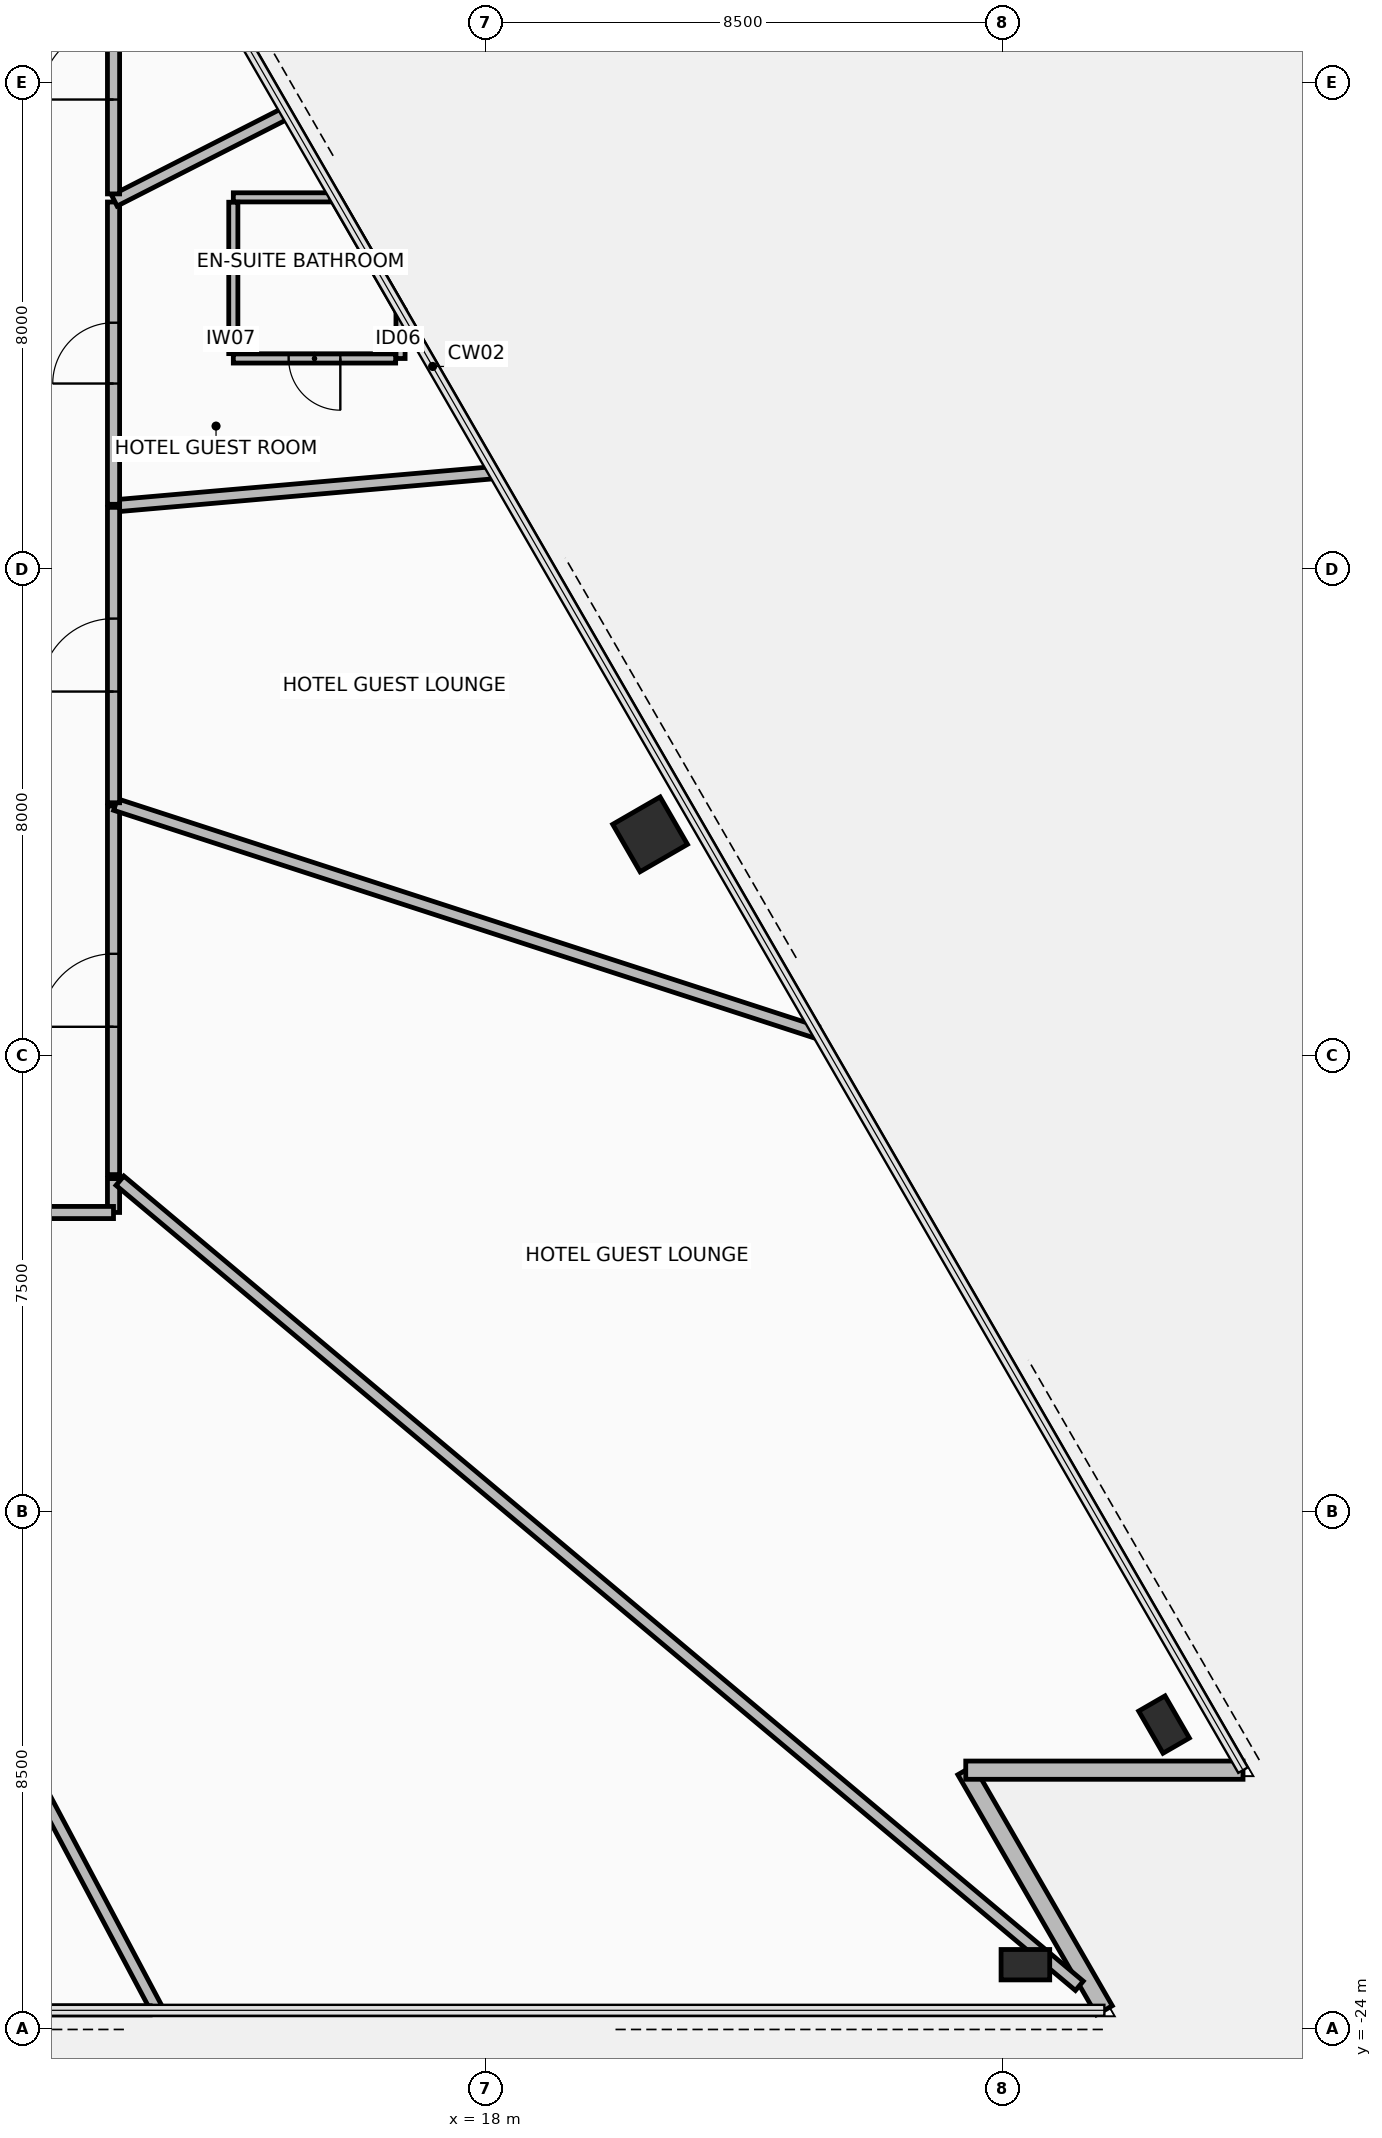
"""IFC4 building model, lengths in metres.
Left out: names, types, materials, properties, quantities, classifications, styles, units other than length and angle.
Written with IfcOpenShell. Run it as: python <this file> out.ifc"""

import sys

from ifc_helpers import new_model, si_unit, direction, frame, frame_2d, origin, origin_2d, place, context, subcontext, project, spatial, rectangle, hollow_rectangle, extrude, element, fill, save


model = new_model("IFC4")
c1 = context("Model", 3, precision=1e-05, world=origin(), true_north=direction((0.0, 1.0)))
c2 = subcontext(c1, "Body", "Model", "MODEL_VIEW")
j1 = project(units=[si_unit("LENGTHUNIT", "METRE"), si_unit("PLANEANGLEUNIT", "RADIAN")], contexts=[c1])
p1 = place(None, origin())
s1 = spatial("IfcSite", under=j1, at=p1, CompositionType="ELEMENT")
p2 = place(p1, origin())
s2 = spatial("IfcBuilding", under=s1, at=p2, CompositionType="ELEMENT")
p3 = place(p2, frame((0.0, 0.0, 31.8)))
s3 = spatial("IfcBuildingStorey", under=s2, at=p3, CompositionType="ELEMENT", Elevation=31.8)
for number, where, z_axis, x_axis in (
    (1, (26.877, -22.95, 0.0), (0.0, 0.0, 1.0), (1.0, 0.0, 0.0)),
    (2, (29.157, -19.001, 0.0), (0.0, 0.0, 1.0), (-0.5, 0.866, 0.0)),
):
    element("IfcColumn", number, at=place(p3, frame(where, z_axis=z_axis, x_axis=x_axis)), inside=s3, PredefinedType="COLUMN", context=c2, shape_type="SweptSolid", body=[
        extrude(hollow_rectangle(XDim=0.5, YDim=0.8, WallThickness=0.04, at=origin_2d()), origin(), (0.0, 0.0, 1.0), 3.45),
    ])
p4 = place(p3, frame((20.705, -4.361, 0.0), z_axis=(0.0, 0.0, 1.0), x_axis=(-0.500001511499, 0.866024531118, 0.0)))
e3 = element("IfcColumn", 3, at=p4, inside=s3, PredefinedType="COLUMN", context=c2, shape_type="SweptSolid", body=[
    extrude(hollow_rectangle(XDim=0.9, YDim=0.9, WallThickness=0.05, at=origin_2d()), origin(), (0.0, 0.0, 1.0), 3.45),
])
p5 = place(p3, frame((28.176, -23.7, 0.0), z_axis=(0.0, 0.0, 1.0), x_axis=(-0.500014431597, 0.866017071537, 0.0)))
e4 = element("IfcWall", 4, at=p5, inside=s3, PredefinedType="STANDARD", context=c2, shape_type="SweptSolid", body=[
    extrude(rectangle(XDim=4.56, YDim=0.3, at=frame_2d((2.28, 0.0))), origin(), (0.0, 0.0, 1.0), 2.47),
])
p6 = place(p3, frame((25.896, -19.751, 0.0), z_axis=(0.0, 0.0, 1.0), x_axis=(1.0, 0.0, 0.0)))
e5 = element("IfcWall", 5, at=p6, inside=s3, PredefinedType="STANDARD", context=c2, shape_type="SweptSolid", body=[
    extrude(rectangle(XDim=4.56, YDim=0.3, at=frame_2d((2.28, 0.0))), origin(), (0.0, 0.0, 1.0), 2.47),
])
p7 = place(p3, frame((13.85, 6.114, 0.0), z_axis=(0.0, 0.0, 1.0), x_axis=(1.0, 0.0, 0.0)))
e6 = element("IfcWall", 6, at=p7, inside=s3, PredefinedType="PARTITIONING", context=c2, shape_type="SweptSolid", body=[
    extrude(rectangle(XDim=1.672, YDim=0.15, at=frame_2d((0.836, 0.0))), origin(), (0.0, 0.0, 1.0), 2.47),
])
p8 = place(p3, frame((15.522, 6.114, 0.0), z_axis=(0.0, 0.0, 1.0), x_axis=(0.500062410969, -0.865989367796, 0.0)))
e7 = element("IfcWall", 7, at=p8, inside=s3, PredefinedType="PARTITIONING", context=c2, shape_type="SweptSolid", body=[
    extrude(rectangle(XDim=2.155, YDim=0.15, at=frame_2d((1.078, 0.0))), origin(), (0.0, 0.0, 1.0), 3.275),
])
p9 = place(p3, frame((16.6, 4.248, 0.0), z_axis=(0.0, 0.0, 1.0), x_axis=(0.0, -1.0, 0.0)))
e8 = element("IfcWall", 8, at=p9, inside=s3, PredefinedType="PARTITIONING", context=c2, shape_type="SweptSolid", body=[
    extrude(rectangle(XDim=0.784, YDim=0.15, at=frame_2d((0.392, 0.0))), origin(), (0.0, 0.0, 1.0), 3.275),
])
p10 = place(p3, frame((16.52, 3.464, 0.0), z_axis=(0.0, 0.0, 1.0), x_axis=(-1.0, 0.0, 0.0)))
e9 = element("IfcWall", 9, at=p10, inside=s3, PredefinedType="PARTITIONING", context=c2, shape_type="SweptSolid", body=[
    extrude(rectangle(XDim=2.67, YDim=0.15, at=frame_2d((1.335, 0.0))), origin(), (0.0, 0.0, 1.0), 2.47),
])
p11 = place(p10, frame((0.91, 0.0, 0.0)))
e10 = element("IfcOpeningElement", 10, at=p11, cuts=e9, PredefinedType="OPENING", context=c2, shape_type="SweptSolid", body=[
    extrude(rectangle(XDim=0.85, YDim=2.1, at=frame_2d((0.425, 1.05))), frame((0.0, 0.085, 0.0), z_axis=(0.0, -1.0, 0.0), x_axis=(1.0, 0.0, 0.0)), (0.0, 0.0, 1.0), 0.17),
])
p12 = place(p3, frame((13.85, 3.544, 0.0), z_axis=(0.0, 0.0, 1.0), x_axis=(0.0, 1.0, 0.0)))
e11 = element("IfcWall", 11, at=p12, inside=s3, PredefinedType="PARTITIONING", context=c2, shape_type="SweptSolid", body=[
    extrude(rectangle(XDim=2.49, YDim=0.15, at=frame_2d((1.245, 0.0))), origin(), (0.0, 0.0, 1.0), 2.87),
])
p13 = place(p3, frame((7.179, -13.502, 0.0), z_axis=(0.0, 0.0, 1.0), x_axis=(0.469478708188, -0.882943793544, 0.0)))
e12 = element("IfcWall", 12, at=p13, inside=s3, PredefinedType="PARTITIONING", context=c2, shape_type="SweptSolid", body=[
    extrude(rectangle(XDim=11.55, YDim=0.2, at=frame_2d((5.775, 0.0))), origin(), (0.0, 0.0, 1.0), 2.47),
])
p14 = place(p3, frame((12.483, -23.7, 0.0), z_axis=(0.0, 0.0, 1.0), x_axis=(-1.0, 0.0, 0.0)))
e13 = element("IfcWall", 13, at=p14, inside=s3, PredefinedType="PARTITIONING", context=c2, shape_type="SweptSolid", body=[
    extrude(rectangle(XDim=10.386, YDim=0.15, at=frame_2d((5.193, 0.0))), origin(), (0.0, 0.0, 1.0), 3.275),
])
p15 = place(p3, frame((18.136, 1.587, 0.0), z_axis=(0.0, 0.0, 1.0), x_axis=(-0.99619562433, -0.087145155144, 0.0)))
e14 = element("IfcWall", 14, at=p15, inside=s3, PredefinedType="PARTITIONING", context=c2, shape_type="SweptSolid", body=[
    extrude(rectangle(XDim=6.253, YDim=0.2, at=frame_2d((3.126, 0.0))), origin(), (0.0, 0.0, 1.0), 2.47),
])
p16 = place(p3, frame((11.88, 1.067, 0.0), z_axis=(0.0, 0.0, 1.0), x_axis=(0.0, 1.0, 0.0)))
e15 = element("IfcWall", 15, at=p16, inside=s3, PredefinedType="PARTITIONING", context=c2, shape_type="SweptSolid", body=[
    extrude(rectangle(XDim=4.971, YDim=0.2, at=frame_2d((2.486, 0.0))), origin(), (0.0, 0.0, 1.0), 2.87),
])
p17 = place(p16, frame((1.986, 0.0, 0.0)))
e16 = element("IfcOpeningElement", 16, at=p17, cuts=e15, PredefinedType="OPENING", context=c2, shape_type="SweptSolid", body=[
    extrude(rectangle(XDim=1.0, YDim=2.15, at=frame_2d((0.5, 1.075))), frame((0.0, 0.11, 0.0), z_axis=(0.0, -1.0, 0.0), x_axis=(1.0, 0.0, 0.0)), (0.0, 0.0, 1.0), 0.22),
])
p18 = place(p3, frame((11.894, 6.06, 0.0), z_axis=(0.0, 0.0, 1.0), x_axis=(0.89097561597, 0.454051155429, 0.0)))
e17 = element("IfcWall", 17, at=p18, inside=s3, PredefinedType="PARTITIONING", context=c2, shape_type="SweptSolid", body=[
    extrude(rectangle(XDim=3.15, YDim=0.2, at=frame_2d((1.575, 0.0))), origin(), (0.0, 0.0, 1.0), 2.47),
])
p19 = place(p3, frame((11.88, 6.171, 0.0), z_axis=(0.0, 0.0, 1.0), x_axis=(0.0, 1.0, 0.0)))
e18 = element("IfcWall", 18, at=p19, inside=s3, PredefinedType="PARTITIONING", context=c2, shape_type="SweptSolid", body=[
    extrude(rectangle(XDim=4.304, YDim=0.2, at=frame_2d((2.152, 0.0))), origin(), (0.0, 0.0, 1.0), 2.47),
])
p20 = place(p19, frame((1.552, 0.0, 0.0)))
e19 = element("IfcOpeningElement", 19, at=p20, cuts=e18, PredefinedType="OPENING", context=c2, shape_type="SweptSolid", body=[
    extrude(rectangle(XDim=1.2, YDim=2.15, at=frame_2d((0.6, 1.075))), frame((0.0, 0.11, 0.0), z_axis=(0.0, -1.0, 0.0), x_axis=(1.0, 0.0, 0.0)), (0.0, 0.0, 1.0), 0.22),
])
p21 = place(p3, frame((11.88, -10.579, 0.0), z_axis=(0.0, 0.0, 1.0), x_axis=(0.0, 1.0, 0.0)))
e20 = element("IfcWall", 20, at=p21, inside=s3, PredefinedType="PARTITIONING", context=c2, shape_type="SweptSolid", body=[
    extrude(rectangle(XDim=0.557, YDim=0.2, at=frame_2d((0.279, 0.0))), origin(), (0.0, 0.0, 1.0), 2.67),
])
p22 = place(p3, frame((11.985, -10.057, 0.0), z_axis=(0.0, 0.0, 1.0), x_axis=(0.766043557541, -0.642788665076, 0.0)))
e21 = element("IfcWall", 21, at=p22, inside=s3, PredefinedType="PARTITIONING", context=c2, shape_type="SweptSolid", body=[
    extrude(rectangle(XDim=20.598, YDim=0.2, at=frame_2d((10.299, 0.0))), origin(), (0.0, 0.0, 1.0), 2.47),
])
p23 = place(p3, frame((8.232, -10.58, 0.0), z_axis=(0.0, 0.0, 1.0), x_axis=(1.0, 0.0, 0.0)))
e22 = element("IfcWall", 22, at=p23, inside=s3, PredefinedType="PARTITIONING", context=c2, shape_type="SweptSolid", body=[
    extrude(rectangle(XDim=3.647, YDim=0.2, at=frame_2d((1.823, 0.0))), origin(), (0.0, 0.0, 1.0), 2.67),
])
p24 = place(p23, frame((1.324, 0.0, 0.0)))
e23 = element("IfcOpeningElement", 23, at=p24, cuts=e22, PredefinedType="OPENING", context=c2, shape_type="SweptSolid", body=[
    extrude(rectangle(XDim=1.0, YDim=2.15, at=frame_2d((0.5, 1.075))), frame((0.0, 0.11, 0.0), z_axis=(0.0, -1.0, 0.0), x_axis=(1.0, 0.0, 0.0)), (0.0, 0.0, 1.0), 0.22),
])
p25 = place(p3, frame((11.88, -9.957, 0.0), z_axis=(0.0, 0.0, 1.0), x_axis=(0.0, 1.0, 0.0)))
e24 = element("IfcWall", 24, at=p25, inside=s3, PredefinedType="PARTITIONING", context=c2, shape_type="SweptSolid", body=[
    extrude(rectangle(XDim=6.062, YDim=0.2, at=frame_2d((3.031, 0.0))), origin(), (0.0, 0.0, 1.0), 2.67),
])
p26 = place(p25, frame((2.431, 0.0, 0.0)))
e25 = element("IfcOpeningElement", 25, at=p26, cuts=e24, PredefinedType="OPENING", context=c2, shape_type="SweptSolid", body=[
    extrude(rectangle(XDim=1.2, YDim=2.15, at=frame_2d((0.6, 1.075))), frame((0.0, 0.11, 0.0), z_axis=(0.0, -1.0, 0.0), x_axis=(1.0, 0.0, 0.0)), (0.0, 0.0, 1.0), 0.22),
])
p27 = place(p3, frame((11.913, -3.871, 0.0), z_axis=(0.0, 0.0, 1.0), x_axis=(0.95105241731, -0.30902960947, 0.0)))
e26 = element("IfcWall", 26, at=p27, inside=s3, PredefinedType="PARTITIONING", context=c2, shape_type="SweptSolid", body=[
    extrude(rectangle(XDim=12.124, YDim=0.2, at=frame_2d((6.062, 0.0))), origin(), (0.0, 0.0, 1.0), 2.47),
])
p28 = place(p3, frame((11.88, -3.842, 0.0), z_axis=(0.0, 0.0, 1.0), x_axis=(0.0, 1.0, 0.0)))
e27 = element("IfcWall", 27, at=p28, inside=s3, PredefinedType="PARTITIONING", context=c2, shape_type="SweptSolid", body=[
    extrude(rectangle(XDim=4.858, YDim=0.2, at=frame_2d((2.429, 0.0))), origin(), (0.0, 0.0, 1.0), 3.275),
])
p29 = place(p28, frame((1.829, 0.0, 0.0)))
e28 = element("IfcOpeningElement", 28, at=p29, cuts=e27, PredefinedType="OPENING", context=c2, shape_type="SweptSolid", body=[
    extrude(rectangle(XDim=1.2, YDim=2.15, at=frame_2d((0.6, 1.075))), frame((0.0, 0.11, 0.0), z_axis=(0.0, -1.0, 0.0), x_axis=(1.0, 0.0, 0.0)), (0.0, 0.0, 1.0), 0.22),
])
p30 = place(p11, origin())
e29 = element("IfcDoor", 29, at=p30, inside=s3, OperationType="SINGLE_SWING_RIGHT", PredefinedType="DOOR", context=c2, shape_type="SweptSolid", body=[
    extrude(rectangle(XDim=0.85, YDim=2.1, at=frame_2d((0.425, 1.05))), frame((0.0, 0.025, 0.0), z_axis=(0.0, -1.0, 0.0), x_axis=(1.0, 0.0, 0.0)), (0.0, 0.0, 1.0), 0.05),
])
fill(e10, e29)
p31 = place(p17, origin())
e30 = element("IfcDoor", 30, at=p31, inside=s3, OperationType="SINGLE_SWING_LEFT", PredefinedType="DOOR", context=c2, shape_type="SweptSolid", body=[
    extrude(rectangle(XDim=1.0, YDim=2.15, at=frame_2d((0.5, 1.075))), frame((0.0, 0.025, 0.0), z_axis=(0.0, -1.0, 0.0), x_axis=(1.0, 0.0, 0.0)), (0.0, 0.0, 1.0), 0.05),
])
fill(e16, e30)
p32 = place(p20, origin())
e31 = element("IfcDoor", 31, at=p32, inside=s3, OperationType="SINGLE_SWING_LEFT", PredefinedType="DOOR", context=c2, shape_type="SweptSolid", body=[
    extrude(rectangle(XDim=1.2, YDim=2.15, at=frame_2d((0.6, 1.075))), frame((0.0, 0.025, 0.0), z_axis=(0.0, -1.0, 0.0), x_axis=(1.0, 0.0, 0.0)), (0.0, 0.0, 1.0), 0.05),
])
fill(e19, e31)
p33 = place(p26, origin())
e32 = element("IfcDoor", 32, at=p33, inside=s3, OperationType="SINGLE_SWING_LEFT", PredefinedType="DOOR", context=c2, shape_type="SweptSolid", body=[
    extrude(rectangle(XDim=1.2, YDim=2.15, at=frame_2d((0.6, 1.075))), frame((0.0, 0.025, 0.0), z_axis=(0.0, -1.0, 0.0), x_axis=(1.0, 0.0, 0.0)), (0.0, 0.0, 1.0), 0.05),
])
fill(e25, e32)
p34 = place(p29, origin())
e33 = element("IfcDoor", 33, at=p34, inside=s3, OperationType="SINGLE_SWING_LEFT", PredefinedType="DOOR", context=c2, shape_type="SweptSolid", body=[
    extrude(rectangle(XDim=1.2, YDim=2.15, at=frame_2d((0.6, 1.075))), frame((0.0, 0.025, 0.0), z_axis=(0.0, -1.0, 0.0), x_axis=(1.0, 0.0, 0.0)), (0.0, 0.0, 1.0), 0.05),
])
fill(e28, e33)
save(model, sys.argv[1])
